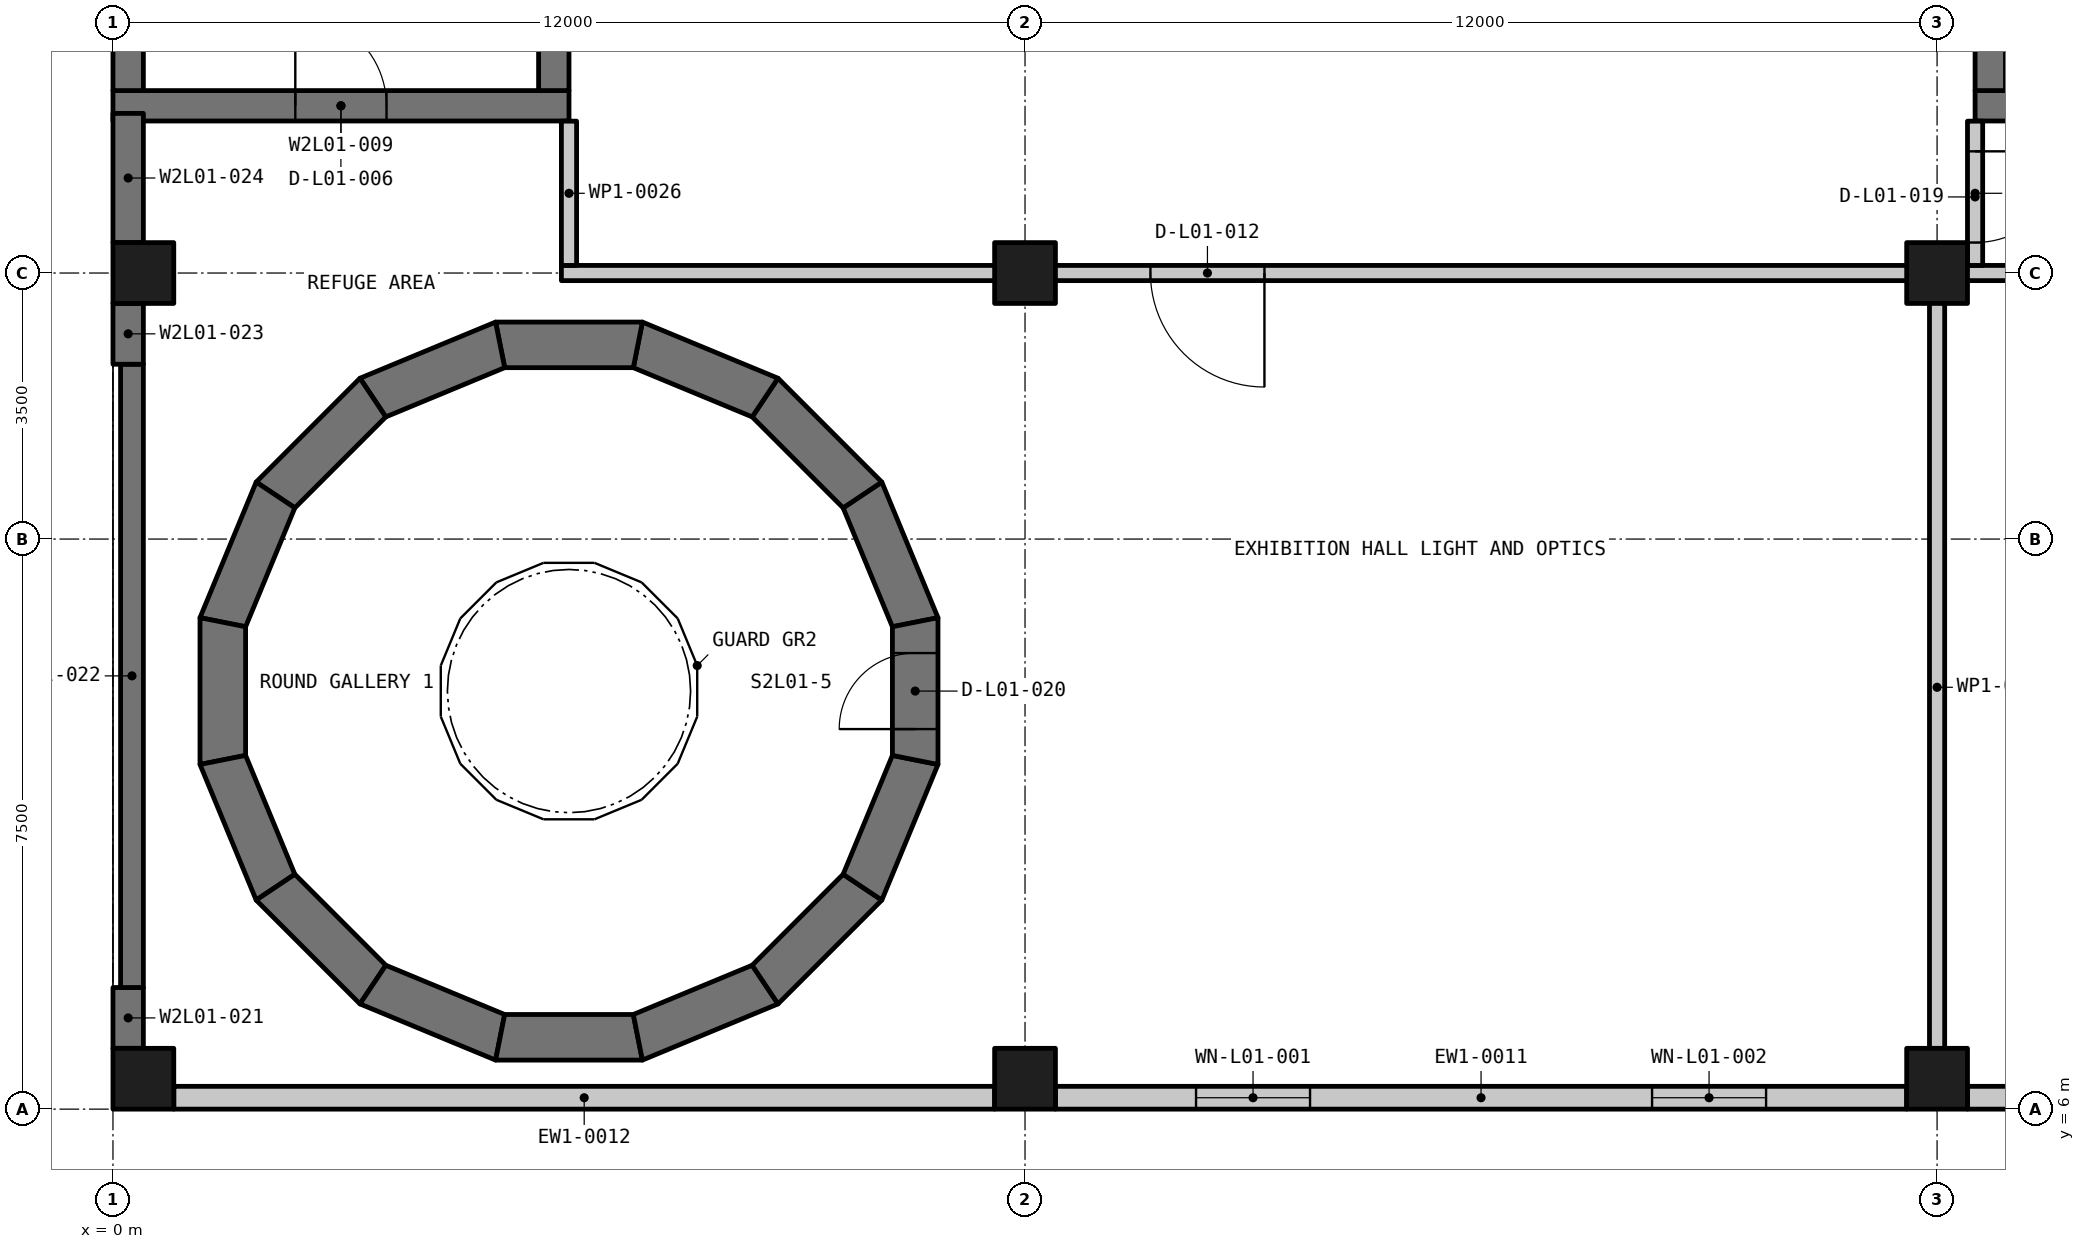
"""IFC4 building model, lengths in metres.
Left out: names, types, materials, properties, quantities, classifications, styles, units other than length and angle.
Written with IfcOpenShell. Run it as: python <this file> out.ifc"""

import sys

from ifc_helpers import new_model, si_unit, direction, frame, frame_2d, origin, origin_2d, place, context, subcontext, project, spatial, polyline, rectangle, outline, extrude, element, fill, save


model = new_model("IFC4")
c1 = context("Model", 3, precision=1e-05, world=origin(), true_north=direction((0.0, 1.0)))
c2 = subcontext(c1, "Body", "Model", "MODEL_VIEW")
j1 = project(units=[si_unit("LENGTHUNIT", "METRE"), si_unit("PLANEANGLEUNIT", "RADIAN")], contexts=[c1])
p1 = place(None, origin())
s1 = spatial("IfcSite", under=j1, at=p1, CompositionType="ELEMENT")
p2 = place(p1, origin())
s2 = spatial("IfcBuilding", under=s1, at=p2, CompositionType="ELEMENT")
p3 = place(p2, frame((0.0, 0.0, 6.0)))
s3 = spatial("IfcBuildingStorey", under=s2, at=p3, CompositionType="ELEMENT", Elevation=6.0)
for number, where, z_axis, x_axis in (
    (1, (0.4, 6.4, -0.3), (0.0, 0.0, 1.0), (1.0, 0.0, 0.0)),
    (2, (0.4, 17.0, -0.3), (0.0, 0.0, 1.0), (1.0, 0.0, 0.0)),
    (3, (12.0, 6.4, -0.3), (0.0, 0.0, 1.0), (1.0, 0.0, 0.0)),
    (4, (12.0, 17.0, -0.3), (0.0, 0.0, 1.0), (1.0, 0.0, 0.0)),
    (5, (24.0, 6.4, -0.3), (0.0, 0.0, 1.0), (1.0, 0.0, 0.0)),
    (6, (24.0, 17.0, -0.3), (0.0, 0.0, 1.0), (1.0, 0.0, 0.0)),
):
    element("IfcColumn", number, at=place(p3, frame(where, z_axis=z_axis, x_axis=x_axis)), inside=s3, PredefinedType="COLUMN", context=c2, shape_type="SweptSolid", body=[
        extrude(rectangle(XDim=0.8, YDim=0.8, at=origin_2d()), origin(), (0.0, 0.0, 1.0), 5.25),
    ])
p4 = place(p3, frame((10.578, 12.351, -0.3), z_axis=(0.0, 0.0, 1.0), x_axis=(-0.382630895081, 0.923901292417, 0.0)))
e7 = element("IfcWall", 7, at=p4, inside=s3, PredefinedType="SHEAR", context=c2, shape_type="SweptSolid", body=[
    extrude(outline(polyline([(0.0, -0.3), (1.931, -0.3), (1.812, 0.3), (0.119, 0.3), (0.0, -0.3)])), origin(), (0.0, 0.0, 1.0), 5.25),
])
p5 = place(p3, frame((9.904, 14.038, -0.3), z_axis=(0.0, 0.0, 1.0), x_axis=(-0.707106781187, 0.707106781187, 0.0)))
e8 = element("IfcWall", 8, at=p5, inside=s3, PredefinedType="SHEAR", context=c2, shape_type="SweptSolid", body=[
    extrude(outline(polyline([(0.0, -0.3), (1.931, -0.3), (1.812, 0.3), (0.119, 0.3), (0.0, -0.3)])), origin(), (0.0, 0.0, 1.0), 5.25),
])
p6 = place(p3, frame((8.635, 15.339, -0.3), z_axis=(0.0, 0.0, 1.0), x_axis=(-0.923901292417, 0.382630895081, 0.0)))
e9 = element("IfcWall", 9, at=p6, inside=s3, PredefinedType="SHEAR", context=c2, shape_type="SweptSolid", body=[
    extrude(outline(polyline([(0.0, -0.3), (1.931, -0.3), (1.812, 0.3), (0.119, 0.3), (0.0, -0.3)])), origin(), (0.0, 0.0, 1.0), 5.25),
])
p7 = place(p3, frame((6.966, 16.055, -0.3), z_axis=(0.0, 0.0, 1.0), x_axis=(-1.0, 0.0, 0.0)))
e10 = element("IfcWall", 10, at=p7, inside=s3, PredefinedType="SHEAR", context=c2, shape_type="SweptSolid", body=[
    extrude(outline(polyline([(-0.0, -0.3), (1.931, -0.3), (1.812, 0.3), (0.119, 0.3), (-0.0, -0.3)])), origin(), (0.0, 0.0, 1.0), 5.25),
])
p8 = place(p3, frame((5.149, 16.078, -0.3), z_axis=(0.0, 0.0, 1.0), x_axis=(-0.923901292417, -0.382630895081, 0.0)))
e11 = element("IfcWall", 11, at=p8, inside=s3, PredefinedType="SHEAR", context=c2, shape_type="SweptSolid", body=[
    extrude(outline(polyline([(0.0, -0.3), (1.931, -0.3), (1.812, 0.3), (0.119, 0.3), (0.0, -0.3)])), origin(), (0.0, 0.0, 1.0), 5.25),
])
p9 = place(p3, frame((3.462, 15.404, -0.3), z_axis=(0.0, 0.0, 1.0), x_axis=(-0.707106781187, -0.707106781187, 0.0)))
e12 = element("IfcWall", 12, at=p9, inside=s3, PredefinedType="SHEAR", context=c2, shape_type="SweptSolid", body=[
    extrude(outline(polyline([(0.0, -0.3), (1.931, -0.3), (1.812, 0.3), (0.119, 0.3), (0.0, -0.3)])), origin(), (0.0, 0.0, 1.0), 5.25),
])
p10 = place(p3, frame((2.161, 14.135, -0.3), z_axis=(0.0, 0.0, 1.0), x_axis=(-0.382630895081, -0.923901292417, 0.0)))
e13 = element("IfcWall", 13, at=p10, inside=s3, PredefinedType="SHEAR", context=c2, shape_type="SweptSolid", body=[
    extrude(outline(polyline([(0.0, -0.3), (1.931, -0.3), (1.812, 0.3), (0.119, 0.3), (0.0, -0.3)])), origin(), (0.0, 0.0, 1.0), 5.25),
])
p11 = place(p3, frame((1.445, 12.466, -0.3), z_axis=(0.0, 0.0, 1.0), x_axis=(0.0, -1.0, 0.0)))
e14 = element("IfcWall", 14, at=p11, inside=s3, PredefinedType="SHEAR", context=c2, shape_type="SweptSolid", body=[
    extrude(outline(polyline([(-0.0, -0.3), (1.931, -0.3), (1.812, 0.3), (0.119, 0.3), (-0.0, -0.3)])), origin(), (0.0, 0.0, 1.0), 5.25),
])
p12 = place(p3, frame((1.422, 10.649, -0.3), z_axis=(0.0, 0.0, 1.0), x_axis=(0.382630895081, -0.923901292417, 0.0)))
e15 = element("IfcWall", 15, at=p12, inside=s3, PredefinedType="SHEAR", context=c2, shape_type="SweptSolid", body=[
    extrude(outline(polyline([(0.0, -0.3), (1.931, -0.3), (1.812, 0.3), (0.119, 0.3), (0.0, -0.3)])), origin(), (0.0, 0.0, 1.0), 5.25),
])
p13 = place(p3, frame((2.096, 8.962, -0.3), z_axis=(0.0, 0.0, 1.0), x_axis=(0.707106781187, -0.707106781187, 0.0)))
e16 = element("IfcWall", 16, at=p13, inside=s3, PredefinedType="SHEAR", context=c2, shape_type="SweptSolid", body=[
    extrude(outline(polyline([(0.0, -0.3), (1.931, -0.3), (1.812, 0.3), (0.119, 0.3), (0.0, -0.3)])), origin(), (0.0, 0.0, 1.0), 5.25),
])
p14 = place(p3, frame((3.365, 7.661, -0.3), z_axis=(0.0, 0.0, 1.0), x_axis=(0.923901292417, -0.382630895081, 0.0)))
e17 = element("IfcWall", 17, at=p14, inside=s3, PredefinedType="SHEAR", context=c2, shape_type="SweptSolid", body=[
    extrude(outline(polyline([(0.0, -0.3), (1.931, -0.3), (1.812, 0.3), (0.119, 0.3), (0.0, -0.3)])), origin(), (0.0, 0.0, 1.0), 5.25),
])
p15 = place(p3, frame((5.034, 6.945, -0.3), z_axis=(0.0, 0.0, 1.0), x_axis=(1.0, 0.0, 0.0)))
e18 = element("IfcWall", 18, at=p15, inside=s3, PredefinedType="SHEAR", context=c2, shape_type="SweptSolid", body=[
    extrude(outline(polyline([(-0.0, -0.3), (1.931, -0.3), (1.812, 0.3), (0.119, 0.3), (-0.0, -0.3)])), origin(), (0.0, 0.0, 1.0), 5.25),
])
p16 = place(p3, frame((6.851, 6.922, -0.3), z_axis=(0.0, 0.0, 1.0), x_axis=(0.923901292417, 0.382630895081, 0.0)))
e19 = element("IfcWall", 19, at=p16, inside=s3, PredefinedType="SHEAR", context=c2, shape_type="SweptSolid", body=[
    extrude(outline(polyline([(0.0, -0.3), (1.931, -0.3), (1.812, 0.3), (0.119, 0.3), (0.0, -0.3)])), origin(), (0.0, 0.0, 1.0), 5.25),
])
p17 = place(p3, frame((8.538, 7.596, -0.3), z_axis=(0.0, 0.0, 1.0), x_axis=(0.707106781187, 0.707106781187, 0.0)))
e20 = element("IfcWall", 20, at=p17, inside=s3, PredefinedType="SHEAR", context=c2, shape_type="SweptSolid", body=[
    extrude(outline(polyline([(0.0, -0.3), (1.931, -0.3), (1.812, 0.3), (0.119, 0.3), (0.0, -0.3)])), origin(), (0.0, 0.0, 1.0), 5.25),
])
p18 = place(p3, frame((9.839, 8.865, -0.3), z_axis=(0.0, 0.0, 1.0), x_axis=(0.382630895081, 0.923901292417, 0.0)))
e21 = element("IfcWall", 21, at=p18, inside=s3, PredefinedType="SHEAR", context=c2, shape_type="SweptSolid", body=[
    extrude(outline(polyline([(0.0, -0.3), (1.931, -0.3), (1.812, 0.3), (0.119, 0.3), (0.0, -0.3)])), origin(), (0.0, 0.0, 1.0), 5.25),
])
p19 = place(p3, frame((10.555, 10.534, -0.3), z_axis=(0.0, 0.0, 1.0), x_axis=(0.0, 1.0, 0.0)))
e22 = element("IfcWall", 22, at=p19, inside=s3, PredefinedType="SHEAR", context=c2, shape_type="SweptSolid", body=[
    extrude(outline(polyline([(-0.0, -0.3), (1.931, -0.3), (1.812, 0.3), (0.119, 0.3), (-0.0, -0.3)])), origin(), (0.0, 0.0, 1.0), 5.25),
])
p20 = place(p19, frame((0.466, 0.0, 0.3)))
e23 = element("IfcOpeningElement", 23, at=p20, cuts=e22, PredefinedType="OPENING", context=c2, shape_type="SweptSolid", body=[
    extrude(rectangle(XDim=1.0, YDim=2.2, at=frame_2d((0.5, 1.1))), frame((0.0, 0.31, 0.0), z_axis=(0.0, -1.0, 0.0), x_axis=(1.0, 0.0, 0.0)), (0.0, 0.0, 1.0), 0.62),
])
p21 = place(p3, frame((0.0, 19.2, -0.3), z_axis=(0.0, 0.0, 1.0), x_axis=(1.0, 0.0, 0.0)))
e24 = element("IfcWall", 24, at=p21, inside=s3, PredefinedType="SHEAR", context=c2, shape_type="SweptSolid", body=[
    extrude(rectangle(XDim=6.0, YDim=0.4, at=frame_2d((3.0, 0.0))), origin(), (0.0, 0.0, 1.0), 5.25),
])
p22 = place(p21, frame((2.399, 0.0, 0.3)))
e25 = element("IfcOpeningElement", 25, at=p22, cuts=e24, PredefinedType="OPENING", context=c2, shape_type="SweptSolid", body=[
    extrude(rectangle(XDim=1.2, YDim=2.2, at=frame_2d((0.6, 1.1))), frame((0.0, 0.21, 0.0), z_axis=(0.0, -1.0, 0.0), x_axis=(1.0, 0.0, 0.0)), (0.0, 0.0, 1.0), 0.42),
])
for number, where, z_axis, x_axis in (
    (26, (5.8, 19.4, -0.3), (0.0, 0.0, 1.0), (0.0, 1.0, 0.0)),
    (27, (0.2, 19.4, -0.3), (0.0, 0.0, 1.0), (0.0, 1.0, 0.0)),
):
    element("IfcWall", number, at=place(p3, frame(where, z_axis=z_axis, x_axis=x_axis)), inside=s3, PredefinedType="SHEAR", context=c2, shape_type="SweptSolid", body=[
        extrude(rectangle(XDim=8.2, YDim=0.4, at=frame_2d((4.1, 0.0))), origin(), (0.0, 0.0, 1.0), 5.25),
    ])
p23 = place(p3, frame((24.5, 19.2, -0.3), z_axis=(0.0, 0.0, 1.0), x_axis=(1.0, 0.0, 0.0)))
e28 = element("IfcWall", 28, at=p23, inside=s3, PredefinedType="SHEAR", context=c2, shape_type="SweptSolid", body=[
    extrude(rectangle(XDim=5.5, YDim=0.4, at=frame_2d((2.75, 0.0))), origin(), (0.0, 0.0, 1.0), 5.25),
])
p24 = place(p3, frame((24.7, 19.4, -0.3), z_axis=(0.0, 0.0, 1.0), x_axis=(0.0, 1.0, 0.0)))
e29 = element("IfcWall", 29, at=p24, inside=s3, PredefinedType="SHEAR", context=c2, shape_type="SweptSolid", body=[
    extrude(rectangle(XDim=8.2, YDim=0.4, at=frame_2d((4.1, 0.0))), origin(), (0.0, 0.0, 1.0), 5.25),
])
p25 = place(p3, frame((0.2, 6.8, -0.3), z_axis=(0.0, 0.0, 1.0), x_axis=(0.0, 1.0, 0.0)))
e30 = element("IfcWall", 30, at=p25, inside=s3, PredefinedType="SOLIDWALL", context=c2, shape_type="SweptSolid", body=[
    extrude(rectangle(XDim=0.8, YDim=0.4, at=frame_2d((0.4, 0.0))), origin(), (0.0, 0.0, 1.0), 5.25),
])
p26 = place(p3, frame((0.25, 7.6, -0.3), z_axis=(0.0, 0.0, 1.0), x_axis=(0.0, 1.0, 0.0)))
e31 = element("IfcWall", 31, at=p26, inside=s3, PredefinedType="SOLIDWALL", context=c2, shape_type="SweptSolid", body=[
    extrude(rectangle(XDim=8.2, YDim=0.3, at=frame_2d((4.1, 0.0))), origin(), (0.0, 0.0, 1.0), 5.25),
])
p27 = place(p3, frame((0.2, 15.8, -0.3), z_axis=(0.0, 0.0, 1.0), x_axis=(0.0, 1.0, 0.0)))
e32 = element("IfcWall", 32, at=p27, inside=s3, PredefinedType="SOLIDWALL", context=c2, shape_type="SweptSolid", body=[
    extrude(rectangle(XDim=0.8, YDim=0.4, at=frame_2d((0.4, 0.0))), origin(), (0.0, 0.0, 1.0), 5.25),
])
p28 = place(p3, frame((0.2, 17.4, -0.3), z_axis=(0.0, 0.0, 1.0), x_axis=(0.0, 1.0, 0.0)))
e33 = element("IfcWall", 33, at=p28, inside=s3, PredefinedType="SOLIDWALL", context=c2, shape_type="SweptSolid", body=[
    extrude(rectangle(XDim=1.7, YDim=0.4, at=frame_2d((0.85, 0.0))), origin(), (0.0, 0.0, 1.0), 5.25),
])
p29 = place(p3, frame((35.55, 6.15, 0.0), z_axis=(0.0, 0.0, 1.0), x_axis=(-1.0, 0.0, 0.0)))
e34 = element("IfcWall", 34, at=p29, inside=s3, PredefinedType="SOLIDWALL", context=c2, shape_type="SweptSolid", body=[
    extrude(rectangle(XDim=11.15, YDim=0.3, at=frame_2d((5.575, 0.0))), origin(), (0.0, 0.0, 1.0), 4.05),
])
p30 = place(p3, frame((23.6, 6.15, 0.0), z_axis=(0.0, 0.0, 1.0), x_axis=(-1.0, 0.0, 0.0)))
e35 = element("IfcWall", 35, at=p30, inside=s3, PredefinedType="SOLIDWALL", context=c2, shape_type="SweptSolid", body=[
    extrude(rectangle(XDim=11.2, YDim=0.3, at=frame_2d((5.6, 0.0))), origin(), (0.0, 0.0, 1.0), 4.05),
])
p31 = place(p30, frame((7.85, 0.0, 0.75)))
e36 = element("IfcOpeningElement", 36, at=p31, cuts=e35, PredefinedType="OPENING", context=c2, shape_type="SweptSolid", body=[
    extrude(rectangle(XDim=1.5, YDim=2.25, at=frame_2d((0.75, 1.125))), frame((0.0, 0.16, 0.0), z_axis=(0.0, -1.0, 0.0), x_axis=(1.0, 0.0, 0.0)), (0.0, 0.0, 1.0), 0.32),
])
p32 = place(p30, frame((1.85, 0.0, 0.75)))
e37 = element("IfcOpeningElement", 37, at=p32, cuts=e35, PredefinedType="OPENING", context=c2, shape_type="SweptSolid", body=[
    extrude(rectangle(XDim=1.5, YDim=2.25, at=frame_2d((0.75, 1.125))), frame((0.0, 0.16, 0.0), z_axis=(0.0, -1.0, 0.0), x_axis=(1.0, 0.0, 0.0)), (0.0, 0.0, 1.0), 0.32),
])
p33 = place(p3, frame((11.6, 6.15, 0.0), z_axis=(0.0, 0.0, 1.0), x_axis=(-1.0, 0.0, 0.0)))
e38 = element("IfcWall", 38, at=p33, inside=s3, PredefinedType="SOLIDWALL", context=c2, shape_type="SweptSolid", body=[
    extrude(rectangle(XDim=10.8, YDim=0.3, at=frame_2d((5.4, 0.0))), origin(), (0.0, 0.0, 1.0), 4.05),
])
p34 = place(p3, frame((65.9, 17.0, 0.0), z_axis=(0.0, 0.0, 1.0), x_axis=(-1.0, 0.0, 0.0)))
e39 = element("IfcWall", 39, at=p34, inside=s3, PredefinedType="PARTITIONING", context=c2, shape_type="SweptSolid", body=[
    extrude(rectangle(XDim=60.0, YDim=0.2, at=frame_2d((30.0, 0.0))), origin(), (0.0, 0.0, 1.0), 4.05),
])
p35 = place(p34, frame((50.75, 0.0, 0.0)))
e40 = element("IfcOpeningElement", 40, at=p35, cuts=e39, PredefinedType="OPENING", context=c2, shape_type="SweptSolid", body=[
    extrude(rectangle(XDim=1.5, YDim=2.1, at=frame_2d((0.75, 1.05))), frame((0.0, 0.11, 0.0), z_axis=(0.0, -1.0, 0.0), x_axis=(1.0, 0.0, 0.0)), (0.0, 0.0, 1.0), 0.22),
])
p36 = place(p34, frame((37.401, 0.0, 0.0)))
e41 = element("IfcOpeningElement", 41, at=p36, cuts=e39, PredefinedType="OPENING", context=c2, shape_type="SweptSolid", body=[
    extrude(rectangle(XDim=2.0, YDim=2.1, at=frame_2d((1.0, 1.05))), frame((0.0, 0.11, 0.0), z_axis=(0.0, -1.0, 0.0), x_axis=(1.0, 0.0, 0.0)), (0.0, 0.0, 1.0), 0.22),
])
p37 = place(p34, frame((11.15, 0.0, 0.0)))
e42 = element("IfcOpeningElement", 42, at=p37, cuts=e39, PredefinedType="OPENING", context=c2, shape_type="SweptSolid", body=[
    extrude(rectangle(XDim=1.5, YDim=2.1, at=frame_2d((0.75, 1.05))), frame((0.0, 0.11, 0.0), z_axis=(0.0, -1.0, 0.0), x_axis=(1.0, 0.0, 0.0)), (0.0, 0.0, 1.0), 0.22),
])
p38 = place(p34, frame((2.251, 0.0, 0.0)))
e43 = element("IfcOpeningElement", 43, at=p38, cuts=e39, PredefinedType="OPENING", context=c2, shape_type="SweptSolid", body=[
    extrude(rectangle(XDim=2.0, YDim=2.1, at=frame_2d((1.0, 1.05))), frame((0.0, 0.11, 0.0), z_axis=(0.0, -1.0, 0.0), x_axis=(1.0, 0.0, 0.0)), (0.0, 0.0, 1.0), 0.22),
])
p39 = place(p3, frame((24.5, 18.998, 0.0), z_axis=(0.0, 0.0, 1.0), x_axis=(0.0, -1.0, 0.0)))
e44 = element("IfcWall", 44, at=p39, inside=s3, PredefinedType="PARTITIONING", context=c2, shape_type="SweptSolid", body=[
    extrude(rectangle(XDim=1.898, YDim=0.2, at=frame_2d((0.949, 0.0))), origin(), (0.0, 0.0, 1.0), 4.05),
])
p40 = place(p39, frame((0.397, 0.0, 0.0)))
e45 = element("IfcOpeningElement", 45, at=p40, cuts=e44, PredefinedType="OPENING", context=c2, shape_type="SweptSolid", body=[
    extrude(rectangle(XDim=1.2, YDim=2.1, at=frame_2d((0.6, 1.05))), frame((0.0, 0.11, 0.0), z_axis=(0.0, -1.0, 0.0), x_axis=(1.0, 0.0, 0.0)), (0.0, 0.0, 1.0), 0.22),
])
p41 = place(p3, frame((24.0, 6.2, 0.0), z_axis=(0.0, 0.0, 1.0), x_axis=(0.0, 1.0, 0.0)))
e46 = element("IfcWall", 46, at=p41, inside=s3, PredefinedType="PARTITIONING", context=c2, shape_type="SweptSolid", body=[
    extrude(rectangle(XDim=10.7, YDim=0.2, at=frame_2d((5.35, 0.0))), origin(), (0.0, 0.0, 1.0), 4.05),
])
p42 = place(p3, frame((6.0, 17.1, 0.0), z_axis=(0.0, 0.0, 1.0), x_axis=(0.0, 1.0, 0.0)))
e47 = element("IfcWall", 47, at=p42, inside=s3, PredefinedType="PARTITIONING", context=c2, shape_type="SweptSolid", body=[
    extrude(rectangle(XDim=1.898, YDim=0.2, at=frame_2d((0.949, 0.0))), origin(), (0.0, 0.0, 1.0), 4.05),
])
p43 = place(p31, origin())
e48 = element("IfcWindow", 48, at=p43, inside=s3, PartitioningType="SINGLE_PANEL", PredefinedType="WINDOW", context=c2, shape_type="SweptSolid", body=[
    extrude(rectangle(XDim=1.5, YDim=2.25, at=frame_2d((0.75, 1.125))), frame((0.0, 0.03, 0.0), z_axis=(0.0, -1.0, 0.0), x_axis=(1.0, 0.0, 0.0)), (0.0, 0.0, 1.0), 0.06),
])
fill(e36, e48)
p44 = place(p32, origin())
e49 = element("IfcWindow", 49, at=p44, inside=s3, PartitioningType="SINGLE_PANEL", PredefinedType="WINDOW", context=c2, shape_type="SweptSolid", body=[
    extrude(rectangle(XDim=1.5, YDim=2.25, at=frame_2d((0.75, 1.125))), frame((0.0, 0.03, 0.0), z_axis=(0.0, -1.0, 0.0), x_axis=(1.0, 0.0, 0.0)), (0.0, 0.0, 1.0), 0.06),
])
fill(e37, e49)
p45 = place(p22, origin())
e50 = element("IfcDoor", 50, at=p45, inside=s3, OperationType="SINGLE_SWING_RIGHT", PredefinedType="DOOR", context=c2, shape_type="SweptSolid", body=[
    extrude(rectangle(XDim=1.2, YDim=2.2, at=frame_2d((0.6, 1.1))), frame((0.0, 0.025, 0.0), z_axis=(0.0, -1.0, 0.0), x_axis=(1.0, 0.0, 0.0)), (0.0, 0.0, 1.0), 0.05),
])
fill(e25, e50)
p46 = place(p35, origin())
e51 = element("IfcDoor", 51, at=p46, inside=s3, OperationType="DOUBLE_DOOR_SINGLE_SWING", PredefinedType="DOOR", context=c2, shape_type="SweptSolid", body=[
    extrude(rectangle(XDim=1.5, YDim=2.1, at=frame_2d((0.75, 1.05))), frame((0.0, 0.025, 0.0), z_axis=(0.0, -1.0, 0.0), x_axis=(1.0, 0.0, 0.0)), (0.0, 0.0, 1.0), 0.05),
])
fill(e40, e51)
p47 = place(p40, origin())
e52 = element("IfcDoor", 52, at=p47, inside=s3, OperationType="SINGLE_SWING_LEFT", PredefinedType="DOOR", context=c2, shape_type="SweptSolid", body=[
    extrude(rectangle(XDim=1.2, YDim=2.1, at=frame_2d((0.6, 1.05))), frame((0.0, 0.025, 0.0), z_axis=(0.0, -1.0, 0.0), x_axis=(1.0, 0.0, 0.0)), (0.0, 0.0, 1.0), 0.05),
])
fill(e45, e52)
p48 = place(p20, origin())
e53 = element("IfcDoor", 53, at=p48, inside=s3, OperationType="SINGLE_SWING_LEFT", PredefinedType="DOOR", context=c2, shape_type="SweptSolid", body=[
    extrude(rectangle(XDim=1.0, YDim=2.2, at=frame_2d((0.5, 1.1))), frame((0.0, 0.025, 0.0), z_axis=(0.0, -1.0, 0.0), x_axis=(1.0, 0.0, 0.0)), (0.0, 0.0, 1.0), 0.05),
])
fill(e23, e53)
save(model, sys.argv[1])
